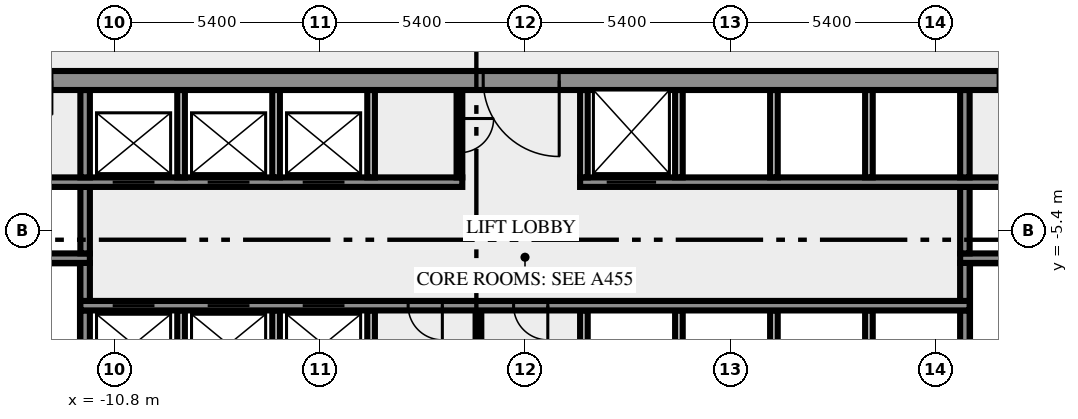
"""IFC4 building model, lengths in metres.
Left out: names, types, materials, properties, quantities, classifications, styles, units other than length and angle.
Written with IfcOpenShell. Run it as: python <this file> out.ifc"""

import sys

from ifc_helpers import new_model, si_unit, direction, frame, frame_2d, origin, place, context, subcontext, project, spatial, rectangle, extrude, element, fill, save


model = new_model("IFC4")
c1 = context("Model", 3, precision=1e-05, world=origin(), true_north=direction((0.0, 1.0)))
c2 = subcontext(c1, "Body", "Model", "MODEL_VIEW")
j1 = project(units=[si_unit("LENGTHUNIT", "METRE"), si_unit("PLANEANGLEUNIT", "RADIAN")], contexts=[c1])
p1 = place(None, origin())
s1 = spatial("IfcSite", under=j1, at=p1, CompositionType="ELEMENT")
p2 = place(p1, origin())
s2 = spatial("IfcBuilding", under=s1, at=p2, CompositionType="ELEMENT")
p3 = place(p2, frame((0.0, 0.0, 47.0)))
s3 = spatial("IfcBuildingStorey", under=s2, at=p3, CompositionType="ELEMENT", Elevation=47.0)
p4 = place(p3, frame((-11.575, -10.5, 0.0), z_axis=(0.0, 0.0, 1.0), x_axis=(0.0, 1.0, 0.0)))
e1 = element("IfcWall", 1, at=p4, inside=s3, PredefinedType="SHEAR", context=c2, shape_type="SweptSolid", body=[
    extrude(rectangle(XDim=3.0, YDim=0.25, at=frame_2d((1.5, 0.0))), origin(), (0.0, 0.0, 1.0), 3.65),
])
for number, where, z_axis, x_axis in (
    (2, (-9.05, -10.5, 0.0), (0.0, 0.0, 1.0), (0.0, 1.0, 0.0)),
    (3, (-6.55, -10.5, 0.0), (0.0, 0.0, 1.0), (0.0, 1.0, 0.0)),
    (4, (-4.05, -10.5, 0.0), (0.0, 0.0, 1.0), (0.0, 1.0, 0.0)),
):
    element("IfcWall", number, at=place(p3, frame(where, z_axis=z_axis, x_axis=x_axis)), inside=s3, PredefinedType="SOLIDWALL", context=c2, shape_type="SweptSolid", body=[
        extrude(rectangle(XDim=3.0, YDim=0.2, at=frame_2d((1.5, 0.0))), origin(), (0.0, 0.0, 1.0), 3.65),
    ])
p5 = place(p3, frame((-1.225, -10.5, 0.0), z_axis=(0.0, 0.0, 1.0), x_axis=(0.0, 1.0, 0.0)))
e5 = element("IfcWall", 5, at=p5, inside=s3, PredefinedType="PARTITIONING", context=c2, shape_type="SweptSolid", body=[
    extrude(rectangle(XDim=3.0, YDim=0.15, at=frame_2d((1.5, 0.0))), origin(), (0.0, 0.0, 1.0), 3.65),
])
for number, where, z_axis, x_axis in (
    (6, (1.55, -10.5, 0.0), (0.0, 0.0, 1.0), (0.0, 1.0, 0.0)),
    (7, (4.05, -10.5, 0.0), (0.0, 0.0, 1.0), (0.0, 1.0, 0.0)),
    (8, (6.55, -10.5, 0.0), (0.0, 0.0, 1.0), (0.0, 1.0, 0.0)),
    (9, (9.05, -10.5, 0.0), (0.0, 0.0, 1.0), (0.0, 1.0, 0.0)),
):
    element("IfcWall", number, at=place(p3, frame(where, z_axis=z_axis, x_axis=x_axis)), inside=s3, PredefinedType="SOLIDWALL", context=c2, shape_type="SweptSolid", body=[
        extrude(rectangle(XDim=3.0, YDim=0.2, at=frame_2d((1.5, 0.0))), origin(), (0.0, 0.0, 1.0), 3.65),
    ])
p6 = place(p3, frame((11.575, -10.5, 0.0), z_axis=(0.0, 0.0, 1.0), x_axis=(0.0, 1.0, 0.0)))
e10 = element("IfcWall", 10, at=p6, inside=s3, PredefinedType="SHEAR", context=c2, shape_type="SweptSolid", body=[
    extrude(rectangle(XDim=3.0, YDim=0.25, at=frame_2d((1.5, 0.0))), origin(), (0.0, 0.0, 1.0), 3.65),
])
p7 = place(p3, frame((11.7, -7.375, 0.0), z_axis=(0.0, 0.0, 1.0), x_axis=(-1.0, 0.0, 0.0)))
e11 = element("IfcWall", 11, at=p7, inside=s3, PredefinedType="SHEAR", context=c2, shape_type="SweptSolid", body=[
    extrude(rectangle(XDim=23.4, YDim=0.25, at=frame_2d((11.7, 0.0))), origin(), (0.0, 0.0, 1.0), 3.65),
])
p8 = place(p7, frame((21.45, 0.0, 0.0)))
e12 = element("IfcOpeningElement", 12, at=p8, cuts=e11, PredefinedType="OPENING", context=c2, shape_type="SweptSolid", body=[
    extrude(rectangle(XDim=1.1, YDim=2.1, at=frame_2d((0.55, 1.05))), frame((0.0, 0.135, 0.0), z_axis=(0.0, -1.0, 0.0), x_axis=(1.0, 0.0, 0.0)), (0.0, 0.0, 1.0), 0.27),
])
p9 = place(p7, frame((18.95, 0.0, 0.0)))
e13 = element("IfcOpeningElement", 13, at=p9, cuts=e11, PredefinedType="OPENING", context=c2, shape_type="SweptSolid", body=[
    extrude(rectangle(XDim=1.1, YDim=2.1, at=frame_2d((0.55, 1.05))), frame((0.0, 0.135, 0.0), z_axis=(0.0, -1.0, 0.0), x_axis=(1.0, 0.0, 0.0)), (0.0, 0.0, 1.0), 0.27),
])
p10 = place(p7, frame((16.45, 0.0, 0.0)))
e14 = element("IfcOpeningElement", 14, at=p10, cuts=e11, PredefinedType="OPENING", context=c2, shape_type="SweptSolid", body=[
    extrude(rectangle(XDim=1.1, YDim=2.1, at=frame_2d((0.55, 1.05))), frame((0.0, 0.135, 0.0), z_axis=(0.0, -1.0, 0.0), x_axis=(1.0, 0.0, 0.0)), (0.0, 0.0, 1.0), 0.27),
])
p11 = place(p7, frame((13.875, 0.0, 0.0)))
e15 = element("IfcOpeningElement", 15, at=p11, cuts=e11, PredefinedType="OPENING", context=c2, shape_type="SweptSolid", body=[
    extrude(rectangle(XDim=0.9, YDim=2.1, at=frame_2d((0.45, 1.05))), frame((0.0, 0.135, 0.0), z_axis=(0.0, -1.0, 0.0), x_axis=(1.0, 0.0, 0.0)), (0.0, 0.0, 1.0), 0.27),
])
p12 = place(p7, frame((11.1, 0.0, 0.0)))
e16 = element("IfcOpeningElement", 16, at=p12, cuts=e11, PredefinedType="OPENING", context=c2, shape_type="SweptSolid", body=[
    extrude(rectangle(XDim=0.9, YDim=2.1, at=frame_2d((0.45, 1.05))), frame((0.0, 0.135, 0.0), z_axis=(0.0, -1.0, 0.0), x_axis=(1.0, 0.0, 0.0)), (0.0, 0.0, 1.0), 0.27),
])
for number, where, z_axis, x_axis in (
    (17, (-11.575, -7.25, 0.0), (0.0, 0.0, 1.0), (0.0, 1.0, 0.0)),
    (18, (11.575, -7.25, 0.0), (0.0, 0.0, 1.0), (0.0, 1.0, 0.0)),
):
    element("IfcWall", number, at=place(p3, frame(where, z_axis=z_axis, x_axis=x_axis)), inside=s3, PredefinedType="SHEAR", context=c2, shape_type="SweptSolid", body=[
        extrude(rectangle(XDim=1.0, YDim=0.25, at=frame_2d((0.5, 0.0))), origin(), (0.0, 0.0, 1.0), 3.65),
    ])
p13 = place(p3, frame((-11.45, -6.125, 0.0), z_axis=(0.0, 0.0, 1.0), x_axis=(-1.0, 0.0, 0.0)))
e19 = element("IfcWall", 19, at=p13, inside=s3, PredefinedType="SHEAR", context=c2, shape_type="SweptSolid", body=[
    extrude(rectangle(XDim=8.05, YDim=0.25, at=frame_2d((4.025, 0.0))), origin(), (0.0, 0.0, 1.0), 3.65),
])
p14 = place(p13, frame((6.2, 0.0, 0.0)))
e20 = element("IfcOpeningElement", 20, at=p14, cuts=e19, PredefinedType="OPENING", context=c2, shape_type="SweptSolid", body=[
    extrude(rectangle(XDim=1.8, YDim=2.1, at=frame_2d((0.9, 1.05))), frame((0.0, 0.135, 0.0), z_axis=(0.0, -1.0, 0.0), x_axis=(1.0, 0.0, 0.0)), (0.0, 0.0, 1.0), 0.27),
])
p15 = place(p3, frame((19.5, -6.125, 0.0), z_axis=(0.0, 0.0, 1.0), x_axis=(-1.0, 0.0, 0.0)))
e21 = element("IfcWall", 21, at=p15, inside=s3, PredefinedType="SHEAR", context=c2, shape_type="SweptSolid", body=[
    extrude(rectangle(XDim=8.05, YDim=0.25, at=frame_2d((4.025, 0.0))), origin(), (0.0, 0.0, 1.0), 3.65),
])
p16 = place(p15, frame((0.05, 0.0, 0.0)))
e22 = element("IfcOpeningElement", 22, at=p16, cuts=e21, PredefinedType="OPENING", context=c2, shape_type="SweptSolid", body=[
    extrude(rectangle(XDim=1.8, YDim=2.1, at=frame_2d((0.9, 1.05))), frame((0.0, 0.135, 0.0), z_axis=(0.0, -1.0, 0.0), x_axis=(1.0, 0.0, 0.0)), (0.0, 0.0, 1.0), 0.27),
])
for number, where, z_axis, x_axis in (
    (23, (-11.575, -6.0, 0.0), (0.0, 0.0, 1.0), (0.0, 1.0, 0.0)),
    (24, (11.575, -6.0, 0.0), (0.0, 0.0, 1.0), (0.0, 1.0, 0.0)),
):
    element("IfcWall", number, at=place(p3, frame(where, z_axis=z_axis, x_axis=x_axis)), inside=s3, PredefinedType="SHEAR", context=c2, shape_type="SweptSolid", body=[
        extrude(rectangle(XDim=1.75, YDim=0.25, at=frame_2d((0.875, 0.0))), origin(), (0.0, 0.0, 1.0), 3.65),
    ])
p17 = place(p3, frame((-14.35, -4.125, 0.0), z_axis=(0.0, 0.0, 1.0), x_axis=(1.0, 0.0, 0.0)))
e25 = element("IfcWall", 25, at=p17, inside=s3, PredefinedType="SHEAR", context=c2, shape_type="SweptSolid", body=[
    extrude(rectangle(XDim=12.7, YDim=0.25, at=frame_2d((6.35, 0.0))), origin(), (0.0, 0.0, 1.0), 3.65),
])
p18 = place(p17, frame((3.5, 0.0, 0.0)))
e26 = element("IfcOpeningElement", 26, at=p18, cuts=e25, PredefinedType="OPENING", context=c2, shape_type="SweptSolid", body=[
    extrude(rectangle(XDim=1.1, YDim=2.1, at=frame_2d((0.55, 1.05))), frame((0.0, 0.135, 0.0), z_axis=(0.0, -1.0, 0.0), x_axis=(1.0, 0.0, 0.0)), (0.0, 0.0, 1.0), 0.27),
])
p19 = place(p17, frame((6.0, 0.0, 0.0)))
e27 = element("IfcOpeningElement", 27, at=p19, cuts=e25, PredefinedType="OPENING", context=c2, shape_type="SweptSolid", body=[
    extrude(rectangle(XDim=1.1, YDim=2.1, at=frame_2d((0.55, 1.05))), frame((0.0, 0.135, 0.0), z_axis=(0.0, -1.0, 0.0), x_axis=(1.0, 0.0, 0.0)), (0.0, 0.0, 1.0), 0.27),
])
p20 = place(p17, frame((8.5, 0.0, 0.0)))
e28 = element("IfcOpeningElement", 28, at=p20, cuts=e25, PredefinedType="OPENING", context=c2, shape_type="SweptSolid", body=[
    extrude(rectangle(XDim=1.1, YDim=2.1, at=frame_2d((0.55, 1.05))), frame((0.0, 0.135, 0.0), z_axis=(0.0, -1.0, 0.0), x_axis=(1.0, 0.0, 0.0)), (0.0, 0.0, 1.0), 0.27),
])
p21 = place(p3, frame((1.45, -4.125, 0.0), z_axis=(0.0, 0.0, 1.0), x_axis=(1.0, 0.0, 0.0)))
e29 = element("IfcWall", 29, at=p21, inside=s3, PredefinedType="SHEAR", context=c2, shape_type="SweptSolid", body=[
    extrude(rectangle(XDim=12.9, YDim=0.25, at=frame_2d((6.45, 0.0))), origin(), (0.0, 0.0, 1.0), 3.65),
])
p22 = place(p21, frame((0.7, 0.0, 0.0)))
e30 = element("IfcOpeningElement", 30, at=p22, cuts=e29, PredefinedType="OPENING", context=c2, shape_type="SweptSolid", body=[
    extrude(rectangle(XDim=1.3, YDim=2.1, at=frame_2d((0.65, 1.05))), frame((0.0, 0.135, 0.0), z_axis=(0.0, -1.0, 0.0), x_axis=(1.0, 0.0, 0.0)), (0.0, 0.0, 1.0), 0.27),
])
p23 = place(p3, frame((-11.575, -4.0, 0.0), z_axis=(0.0, 0.0, 1.0), x_axis=(0.0, 1.0, 0.0)))
e31 = element("IfcWall", 31, at=p23, inside=s3, PredefinedType="SHEAR", context=c2, shape_type="SweptSolid", body=[
    extrude(rectangle(XDim=2.3, YDim=0.25, at=frame_2d((1.15, 0.0))), origin(), (0.0, 0.0, 1.0), 3.65),
])
for number, where, z_axis, x_axis in (
    (32, (-9.05, -4.0, 0.0), (0.0, 0.0, 1.0), (0.0, 1.0, 0.0)),
    (33, (-6.55, -4.0, 0.0), (0.0, 0.0, 1.0), (0.0, 1.0, 0.0)),
    (34, (-4.05, -4.0, 0.0), (0.0, 0.0, 1.0), (0.0, 1.0, 0.0)),
):
    element("IfcWall", number, at=place(p3, frame(where, z_axis=z_axis, x_axis=x_axis)), inside=s3, PredefinedType="SOLIDWALL", context=c2, shape_type="SweptSolid", body=[
        extrude(rectangle(XDim=2.3, YDim=0.2, at=frame_2d((1.15, 0.0))), origin(), (0.0, 0.0, 1.0), 3.65),
    ])
p24 = place(p3, frame((-1.725, -1.7, 0.0), z_axis=(0.0, 0.0, 1.0), x_axis=(0.0, -1.0, 0.0)))
e35 = element("IfcWall", 35, at=p24, inside=s3, PredefinedType="PARTITIONING", context=c2, shape_type="SweptSolid", body=[
    extrude(rectangle(XDim=2.3, YDim=0.15, at=frame_2d((1.15, 0.0))), origin(), (0.0, 0.0, 1.0), 3.65),
])
p25 = place(p24, frame((0.75, 0.0, 0.0)))
e36 = element("IfcOpeningElement", 36, at=p25, cuts=e35, PredefinedType="OPENING", context=c2, shape_type="SweptSolid", body=[
    extrude(rectangle(XDim=0.9, YDim=2.1, at=frame_2d((0.45, 1.05))), frame((0.0, 0.085, 0.0), z_axis=(0.0, -1.0, 0.0), x_axis=(1.0, 0.0, 0.0)), (0.0, 0.0, 1.0), 0.17),
])
for number, where, z_axis, x_axis in (
    (37, (1.55, -4.0, 0.0), (0.0, 0.0, 1.0), (0.0, 1.0, 0.0)),
    (38, (4.05, -4.0, 0.0), (0.0, 0.0, 1.0), (0.0, 1.0, 0.0)),
    (39, (6.55, -4.0, 0.0), (0.0, 0.0, 1.0), (0.0, 1.0, 0.0)),
    (40, (9.05, -4.0, 0.0), (0.0, 0.0, 1.0), (0.0, 1.0, 0.0)),
):
    element("IfcWall", number, at=place(p3, frame(where, z_axis=z_axis, x_axis=x_axis)), inside=s3, PredefinedType="SOLIDWALL", context=c2, shape_type="SweptSolid", body=[
        extrude(rectangle(XDim=2.3, YDim=0.2, at=frame_2d((1.15, 0.0))), origin(), (0.0, 0.0, 1.0), 3.65),
    ])
p26 = place(p3, frame((11.575, -4.0, 0.0), z_axis=(0.0, 0.0, 1.0), x_axis=(0.0, 1.0, 0.0)))
e41 = element("IfcWall", 41, at=p26, inside=s3, PredefinedType="SHEAR", context=c2, shape_type="SweptSolid", body=[
    extrude(rectangle(XDim=2.3, YDim=0.25, at=frame_2d((1.15, 0.0))), origin(), (0.0, 0.0, 1.0), 3.65),
])
p27 = place(p3, frame((20.49, -1.45, 0.0), z_axis=(0.0, 0.0, 1.0), x_axis=(-1.0, 0.0, 0.0)))
e42 = element("IfcWall", 42, at=p27, inside=s3, PredefinedType="SHEAR", context=c2, shape_type="SweptSolid", body=[
    extrude(rectangle(XDim=40.98, YDim=0.5, at=frame_2d((20.49, 0.0))), origin(), (0.0, 0.0, 1.0), 3.65),
])
p28 = place(p27, frame((38.14, 0.0, 0.0)))
e43 = element("IfcOpeningElement", 43, at=p28, cuts=e42, PredefinedType="OPENING", context=c2, shape_type="SweptSolid", body=[
    extrude(rectangle(XDim=1.8, YDim=2.1, at=frame_2d((0.9, 1.05))), frame((0.0, 0.26, 0.0), z_axis=(0.0, -1.0, 0.0), x_axis=(1.0, 0.0, 0.0)), (0.0, 0.0, 1.0), 0.52),
])
p29 = place(p27, frame((35.89, 0.0, 0.0)))
e44 = element("IfcOpeningElement", 44, at=p29, cuts=e42, PredefinedType="OPENING", context=c2, shape_type="SweptSolid", body=[
    extrude(rectangle(XDim=0.9, YDim=2.1, at=frame_2d((0.45, 1.05))), frame((0.0, 0.26, 0.0), z_axis=(0.0, -1.0, 0.0), x_axis=(1.0, 0.0, 0.0)), (0.0, 0.0, 1.0), 0.52),
])
p30 = place(p27, frame((32.94, 0.0, 0.0)))
e45 = element("IfcOpeningElement", 45, at=p30, cuts=e42, PredefinedType="OPENING", context=c2, shape_type="SweptSolid", body=[
    extrude(rectangle(XDim=0.9, YDim=2.1, at=frame_2d((0.45, 1.05))), frame((0.0, 0.26, 0.0), z_axis=(0.0, -1.0, 0.0), x_axis=(1.0, 0.0, 0.0)), (0.0, 0.0, 1.0), 0.52),
])
p31 = place(p27, frame((19.59, 0.0, 0.0)))
e46 = element("IfcOpeningElement", 46, at=p31, cuts=e42, PredefinedType="OPENING", context=c2, shape_type="SweptSolid", body=[
    extrude(rectangle(XDim=2.0, YDim=2.1, at=frame_2d((1.0, 1.05))), frame((0.0, 0.26, 0.0), z_axis=(0.0, -1.0, 0.0), x_axis=(1.0, 0.0, 0.0)), (0.0, 0.0, 1.0), 0.52),
])
p32 = place(p27, frame((7.14, 0.0, 0.0)))
e47 = element("IfcOpeningElement", 47, at=p32, cuts=e42, PredefinedType="OPENING", context=c2, shape_type="SweptSolid", body=[
    extrude(rectangle(XDim=0.9, YDim=2.1, at=frame_2d((0.45, 1.05))), frame((0.0, 0.26, 0.0), z_axis=(0.0, -1.0, 0.0), x_axis=(1.0, 0.0, 0.0)), (0.0, 0.0, 1.0), 0.52),
])
p33 = place(p27, frame((5.028, 0.0, 0.0)))
e48 = element("IfcOpeningElement", 48, at=p33, cuts=e42, PredefinedType="OPENING", context=c2, shape_type="SweptSolid", body=[
    extrude(rectangle(XDim=0.8, YDim=2.1, at=frame_2d((0.4, 1.05))), frame((0.0, 0.26, 0.0), z_axis=(0.0, -1.0, 0.0), x_axis=(1.0, 0.0, 0.0)), (0.0, 0.0, 1.0), 0.52),
])
p34 = place(p27, frame((3.452, 0.0, 0.0)))
e49 = element("IfcOpeningElement", 49, at=p34, cuts=e42, PredefinedType="OPENING", context=c2, shape_type="SweptSolid", body=[
    extrude(rectangle(XDim=0.8, YDim=2.1, at=frame_2d((0.4, 1.05))), frame((0.0, 0.26, 0.0), z_axis=(0.0, -1.0, 0.0), x_axis=(1.0, 0.0, 0.0)), (0.0, 0.0, 1.0), 0.52),
])
p35 = place(p27, frame((1.04, 0.0, 0.0)))
e50 = element("IfcOpeningElement", 50, at=p35, cuts=e42, PredefinedType="OPENING", context=c2, shape_type="SweptSolid", body=[
    extrude(rectangle(XDim=1.8, YDim=2.1, at=frame_2d((0.9, 1.05))), frame((0.0, 0.26, 0.0), z_axis=(0.0, -1.0, 0.0), x_axis=(1.0, 0.0, 0.0)), (0.0, 0.0, 1.0), 0.52),
])
p36 = place(p8, origin())
e51 = element("IfcDoor", 51, at=p36, inside=s3, OperationType="DOUBLE_DOOR_SLIDING", PredefinedType="DOOR", context=c2, shape_type="SweptSolid", body=[
    extrude(rectangle(XDim=1.1, YDim=2.1, at=frame_2d((0.55, 1.05))), frame((0.0, 0.025, 0.0), z_axis=(0.0, -1.0, 0.0), x_axis=(1.0, 0.0, 0.0)), (0.0, 0.0, 1.0), 0.05),
])
fill(e12, e51)
p37 = place(p9, origin())
e52 = element("IfcDoor", 52, at=p37, inside=s3, OperationType="DOUBLE_DOOR_SLIDING", PredefinedType="DOOR", context=c2, shape_type="SweptSolid", body=[
    extrude(rectangle(XDim=1.1, YDim=2.1, at=frame_2d((0.55, 1.05))), frame((0.0, 0.025, 0.0), z_axis=(0.0, -1.0, 0.0), x_axis=(1.0, 0.0, 0.0)), (0.0, 0.0, 1.0), 0.05),
])
fill(e13, e52)
p38 = place(p10, origin())
e53 = element("IfcDoor", 53, at=p38, inside=s3, OperationType="DOUBLE_DOOR_SLIDING", PredefinedType="DOOR", context=c2, shape_type="SweptSolid", body=[
    extrude(rectangle(XDim=1.1, YDim=2.1, at=frame_2d((0.55, 1.05))), frame((0.0, 0.025, 0.0), z_axis=(0.0, -1.0, 0.0), x_axis=(1.0, 0.0, 0.0)), (0.0, 0.0, 1.0), 0.05),
])
fill(e14, e53)
p39 = place(p11, origin())
e54 = element("IfcDoor", 54, at=p39, inside=s3, OperationType="SINGLE_SWING_RIGHT", PredefinedType="DOOR", context=c2, shape_type="SweptSolid", body=[
    extrude(rectangle(XDim=0.9, YDim=2.1, at=frame_2d((0.45, 1.05))), frame((0.0, 0.025, 0.0), z_axis=(0.0, -1.0, 0.0), x_axis=(1.0, 0.0, 0.0)), (0.0, 0.0, 1.0), 0.05),
])
fill(e15, e54)
p40 = place(p12, origin())
e55 = element("IfcDoor", 55, at=p40, inside=s3, OperationType="SINGLE_SWING_LEFT", PredefinedType="DOOR", context=c2, shape_type="SweptSolid", body=[
    extrude(rectangle(XDim=0.9, YDim=2.1, at=frame_2d((0.45, 1.05))), frame((0.0, 0.025, 0.0), z_axis=(0.0, -1.0, 0.0), x_axis=(1.0, 0.0, 0.0)), (0.0, 0.0, 1.0), 0.05),
])
fill(e16, e55)
p41 = place(p18, origin())
e56 = element("IfcDoor", 56, at=p41, inside=s3, OperationType="DOUBLE_DOOR_SLIDING", PredefinedType="DOOR", context=c2, shape_type="SweptSolid", body=[
    extrude(rectangle(XDim=1.1, YDim=2.1, at=frame_2d((0.55, 1.05))), frame((0.0, 0.025, 0.0), z_axis=(0.0, -1.0, 0.0), x_axis=(1.0, 0.0, 0.0)), (0.0, 0.0, 1.0), 0.05),
])
fill(e26, e56)
p42 = place(p19, origin())
e57 = element("IfcDoor", 57, at=p42, inside=s3, OperationType="DOUBLE_DOOR_SLIDING", PredefinedType="DOOR", context=c2, shape_type="SweptSolid", body=[
    extrude(rectangle(XDim=1.1, YDim=2.1, at=frame_2d((0.55, 1.05))), frame((0.0, 0.025, 0.0), z_axis=(0.0, -1.0, 0.0), x_axis=(1.0, 0.0, 0.0)), (0.0, 0.0, 1.0), 0.05),
])
fill(e27, e57)
p43 = place(p20, origin())
e58 = element("IfcDoor", 58, at=p43, inside=s3, OperationType="DOUBLE_DOOR_SLIDING", PredefinedType="DOOR", context=c2, shape_type="SweptSolid", body=[
    extrude(rectangle(XDim=1.1, YDim=2.1, at=frame_2d((0.55, 1.05))), frame((0.0, 0.025, 0.0), z_axis=(0.0, -1.0, 0.0), x_axis=(1.0, 0.0, 0.0)), (0.0, 0.0, 1.0), 0.05),
])
fill(e28, e58)
p44 = place(p22, origin())
e59 = element("IfcDoor", 59, at=p44, inside=s3, OperationType="DOUBLE_DOOR_SLIDING", PredefinedType="DOOR", context=c2, shape_type="SweptSolid", body=[
    extrude(rectangle(XDim=1.3, YDim=2.1, at=frame_2d((0.65, 1.05))), frame((0.0, 0.025, 0.0), z_axis=(0.0, -1.0, 0.0), x_axis=(1.0, 0.0, 0.0)), (0.0, 0.0, 1.0), 0.05),
])
fill(e30, e59)
p45 = place(p25, origin())
e60 = element("IfcDoor", 60, at=p45, inside=s3, OperationType="SINGLE_SWING_RIGHT", PredefinedType="DOOR", context=c2, shape_type="SweptSolid", body=[
    extrude(rectangle(XDim=0.9, YDim=2.1, at=frame_2d((0.45, 1.05))), frame((0.0, 0.025, 0.0), z_axis=(0.0, -1.0, 0.0), x_axis=(1.0, 0.0, 0.0)), (0.0, 0.0, 1.0), 0.05),
])
fill(e36, e60)
p46 = place(p31, origin())
e61 = element("IfcDoor", 61, at=p46, inside=s3, OperationType="DOUBLE_DOOR_SINGLE_SWING", PredefinedType="DOOR", context=c2, shape_type="SweptSolid", body=[
    extrude(rectangle(XDim=2.0, YDim=2.1, at=frame_2d((1.0, 1.05))), frame((0.0, 0.025, 0.0), z_axis=(0.0, -1.0, 0.0), x_axis=(1.0, 0.0, 0.0)), (0.0, 0.0, 1.0), 0.05),
])
fill(e46, e61)
save(model, sys.argv[1])
